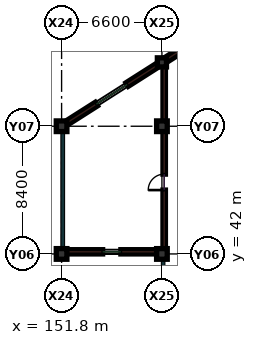
"""IFC4 building model, lengths in metres.
Left out: names, types, materials, properties, quantities, classifications, styles, units other than length and angle.
Written with IfcOpenShell. Run it as: python <this file> out.ifc"""

import sys

from ifc_helpers import new_model, si_unit, direction, frame, frame_2d, origin, origin_2d, place, context, subcontext, project, spatial, rectangle, extrude, element, fill, save


model = new_model("IFC4")
c1 = context("Model", 3, precision=1e-05, world=origin(), true_north=direction((0.0, 1.0)))
c2 = subcontext(c1, "Body", "Model", "MODEL_VIEW")
j1 = project(units=[si_unit("LENGTHUNIT", "METRE"), si_unit("PLANEANGLEUNIT", "RADIAN")], contexts=[c1])
p1 = place(None, origin())
s1 = spatial("IfcSite", under=j1, at=p1, CompositionType="ELEMENT")
p2 = place(p1, origin())
s2 = spatial("IfcBuilding", under=s1, at=p2, CompositionType="ELEMENT")
p3 = place(p2, frame((0.0, 0.0, 14.4)))
s3 = spatial("IfcBuildingStorey", under=s2, at=p3, CompositionType="ELEMENT", Elevation=14.4)
for number, where, z_axis, x_axis in (
    (1, (151.8, 42.0, 0.0), (0.0, 0.0, 1.0), (1.0, 0.0, 0.0)),
    (2, (151.8, 50.4, 0.0), (0.0, 0.0, 1.0), (1.0, 0.0, 0.0)),
    (3, (158.4, 42.0, 0.0), (0.0, 0.0, 1.0), (1.0, 0.0, 0.0)),
    (4, (158.4, 50.4, 0.0), (0.0, 0.0, 1.0), (1.0, 0.0, 0.0)),
):
    element("IfcColumn", number, at=place(p3, frame(where, z_axis=z_axis, x_axis=x_axis)), inside=s3, PredefinedType="COLUMN", context=c2, shape_type="SweptSolid", body=[
        extrude(rectangle(XDim=0.7, YDim=0.7, at=origin_2d()), origin(), (0.0, 0.0, 1.0), 4.2),
    ])
p4 = place(p3, frame((158.4, 54.6, 0.0), z_axis=(0.0, 0.0, 1.0), x_axis=(1.0, 0.0, 0.0)))
e5 = element("IfcColumn", 5, at=p4, inside=s3, PredefinedType="COLUMN", context=c2, shape_type="SweptSolid", body=[
    extrude(rectangle(XDim=0.6, YDim=0.6, at=origin_2d()), origin(), (0.0, 0.0, 1.0), 4.2),
])
p5 = place(p3, frame((158.55, 42.0, 0.0), z_axis=(0.0, 0.0, 1.0), x_axis=(0.0, 1.0, 0.0)))
e6 = element("IfcWall", 6, at=p5, inside=s3, PredefinedType="PARTITIONING", context=c2, shape_type="SweptSolid", body=[
    extrude(rectangle(XDim=7.95, YDim=0.16, at=frame_2d((3.975, 0.0))), origin(), (0.0, 0.0, 1.0), 3.19),
])
p6 = place(p5, frame((4.2, 0.0, 0.0)))
e7 = element("IfcOpeningElement", 7, at=p6, cuts=e6, PredefinedType="OPENING", context=c2, shape_type="SweptSolid", body=[
    extrude(rectangle(XDim=1.05, YDim=2.15, at=frame_2d((0.525, 1.075))), frame((0.0, 0.09, 0.0), z_axis=(0.0, -1.0, 0.0), x_axis=(1.0, 0.0, 0.0)), (0.0, 0.0, 1.0), 0.18),
])
p7 = place(p3, frame((158.55, 50.85, 0.0), z_axis=(0.0, 0.0, 1.0), x_axis=(0.0, 1.0, 0.0)))
e8 = element("IfcWall", 8, at=p7, inside=s3, PredefinedType="PARTITIONING", context=c2, shape_type="SweptSolid", body=[
    extrude(rectangle(XDim=3.8, YDim=0.16, at=frame_2d((1.9, 0.0))), origin(), (0.0, 0.0, 1.0), 3.19),
])
p8 = place(p3, frame((152.145, 42.14, 0.0), z_axis=(0.0, 0.0, 1.0), x_axis=(1.0, 0.0, 0.0)))
e9 = element("IfcWall", 9, at=p8, inside=s3, PredefinedType="SOLIDWALL", context=c2, shape_type="SweptSolid", body=[
    extrude(rectangle(XDim=5.91, YDim=0.28, at=frame_2d((2.955, 0.0))), origin(), (0.0, 0.0, 1.0), 3.325),
])
p9 = place(p8, frame((2.355, 0.0, 0.95)))
e10 = element("IfcOpeningElement", 10, at=p9, cuts=e9, PredefinedType="OPENING", context=c2, shape_type="SweptSolid", body=[
    extrude(rectangle(XDim=1.2, YDim=1.5, at=frame_2d((0.6, 0.75))), frame((0.0, 0.15, 0.0), z_axis=(0.0, -1.0, 0.0), x_axis=(1.0, 0.0, 0.0)), (0.0, 0.0, 1.0), 0.3),
])
p10 = place(p3, frame((152.05, 50.56, 0.0), z_axis=(0.0, 0.0, 1.0), x_axis=(0.843776886751, 0.536694107835, 0.0)))
e11 = element("IfcWall", 11, at=p10, inside=s3, PredefinedType="SOLIDWALL", context=c2, shape_type="SweptSolid", body=[
    extrude(rectangle(XDim=7.229, YDim=0.28, at=frame_2d((3.615, 0.0))), origin(), (0.0, 0.0, 1.0), 3.325),
])
p11 = place(p10, frame((2.415, 0.0, 0.95)))
e12 = element("IfcOpeningElement", 12, at=p11, cuts=e11, PredefinedType="OPENING", context=c2, shape_type="SweptSolid", body=[
    extrude(rectangle(XDim=2.4, YDim=1.6, at=frame_2d((1.2, 0.8))), frame((0.0, 0.15, 0.0), z_axis=(0.0, -1.0, 0.0), x_axis=(1.0, 0.0, 0.0)), (0.0, 0.0, 1.0), 0.3),
])
p12 = place(p3, frame((158.65, 54.76, 0.0), z_axis=(0.0, 0.0, 1.0), x_axis=(0.843786613851, 0.536678814829, 0.0)))
e13 = element("IfcWall", 13, at=p12, inside=s3, PredefinedType="SHEAR", context=c2, shape_type="SweptSolid", body=[
    extrude(rectangle(XDim=7.229, YDim=0.34, at=frame_2d((3.615, 0.0))), origin(), (0.0, 0.0, 1.0), 3.94),
])
p13 = place(p6, origin())
e14 = element("IfcDoor", 14, at=p13, inside=s3, OperationType="SINGLE_SWING_LEFT", PredefinedType="DOOR", context=c2, shape_type="SweptSolid", body=[
    extrude(rectangle(XDim=1.05, YDim=2.15, at=frame_2d((0.525, 1.075))), frame((0.0, 0.025, 0.0), z_axis=(0.0, -1.0, 0.0), x_axis=(1.0, 0.0, 0.0)), (0.0, 0.0, 1.0), 0.05),
])
fill(e7, e14)
p14 = place(p9, origin())
e15 = element("IfcWindow", 15, at=p14, inside=s3, PartitioningType="SINGLE_PANEL", PredefinedType="WINDOW", context=c2, shape_type="SweptSolid", body=[
    extrude(rectangle(XDim=1.2, YDim=1.5, at=frame_2d((0.6, 0.75))), frame((0.0, 0.03, 0.0), z_axis=(0.0, -1.0, 0.0), x_axis=(1.0, 0.0, 0.0)), (0.0, 0.0, 1.0), 0.06),
])
fill(e10, e15)
p15 = place(p11, origin())
e16 = element("IfcWindow", 16, at=p15, inside=s3, PartitioningType="SINGLE_PANEL", PredefinedType="WINDOW", context=c2, shape_type="SweptSolid", body=[
    extrude(rectangle(XDim=2.4, YDim=1.6, at=frame_2d((1.2, 0.8))), frame((0.0, 0.03, 0.0), z_axis=(0.0, -1.0, 0.0), x_axis=(1.0, 0.0, 0.0)), (0.0, 0.0, 1.0), 0.06),
])
fill(e12, e16)
save(model, sys.argv[1])
